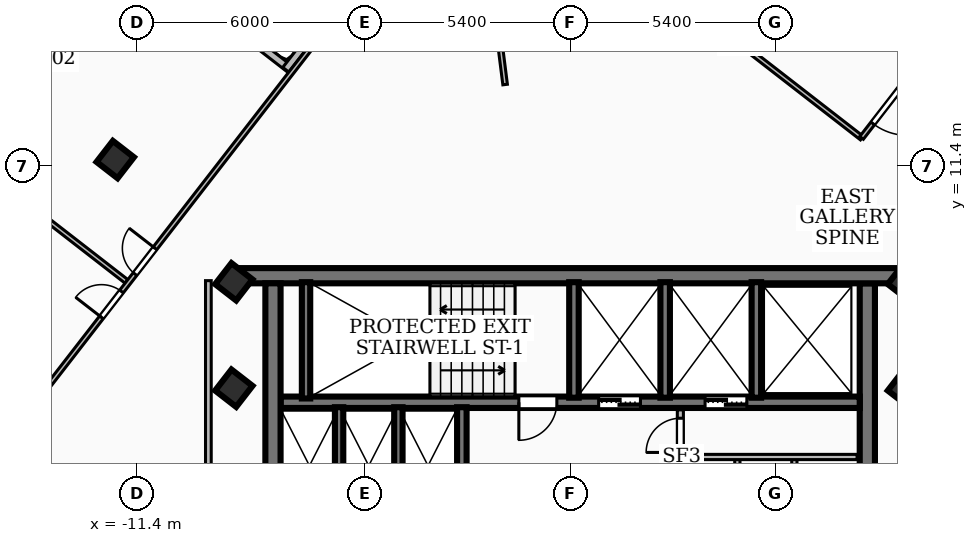
"""IFC4 building model, lengths in metres.
Left out: names, types, materials, properties, quantities, classifications, styles, units other than length and angle.
Written with IfcOpenShell. Run it as: python <this file> out.ifc"""

import sys

from ifc_helpers import new_model, si_unit, direction, frame, frame_2d, origin, origin_2d, place, context, subcontext, project, spatial, rectangle, extrude, element, fill, save


model = new_model("IFC4")
c1 = context("Model", 3, precision=1e-05, world=origin(), true_north=direction((0.0, 1.0)))
c2 = subcontext(c1, "Body", "Model", "MODEL_VIEW")
j1 = project(units=[si_unit("LENGTHUNIT", "METRE"), si_unit("PLANEANGLEUNIT", "RADIAN")], contexts=[c1])
p1 = place(None, origin())
s1 = spatial("IfcSite", under=j1, at=p1, CompositionType="ELEMENT")
p2 = place(p1, origin())
s2 = spatial("IfcBuilding", under=s1, at=p2, CompositionType="ELEMENT")
p3 = place(p2, frame((0.0, 0.0, 257.76)))
s3 = spatial("IfcBuildingStorey", under=s2, at=p3, CompositionType="ELEMENT", Elevation=257.76)
p4 = place(p3, frame((-8.78, 8.51, 0.0), z_axis=(0.0, 0.0, 1.0), x_axis=(1.0, 0.0, 0.0)))
e1 = element("IfcWall", 1, at=p4, inside=s3, PredefinedType="SHEAR", context=c2, shape_type="SweptSolid", body=[
    extrude(rectangle(XDim=17.56, YDim=0.4, at=frame_2d((8.78, 0.0))), origin(), (0.0, 0.0, 1.0), 3.16),
])
for number, where, z_axis, x_axis in (
    (2, (-7.82, 1.95, 0.0), (0.0, 0.0, 1.0), (0.0, 1.0, 0.0)),
    (3, (7.82, 8.31, 0.0), (0.0, 0.0, 1.0), (0.0, -1.0, 0.0)),
):
    element("IfcWall", number, at=place(p3, frame(where, z_axis=z_axis, x_axis=x_axis)), inside=s3, PredefinedType="SHEAR", context=c2, shape_type="SweptSolid", body=[
        extrude(rectangle(XDim=6.36, YDim=0.4, at=frame_2d((3.18, 0.0))), origin(), (0.0, 0.0, 1.0), 3.16),
    ])
p5 = place(p3, frame((7.62, 5.18, 0.0), z_axis=(0.0, 0.0, 1.0), x_axis=(-1.0, 0.0, 0.0)))
e4 = element("IfcWall", 4, at=p5, inside=s3, PredefinedType="SOLIDWALL", context=c2, shape_type="SweptSolid", body=[
    extrude(rectangle(XDim=15.24, YDim=0.3, at=frame_2d((7.62, 0.0))), origin(), (0.0, 0.0, 1.0), 3.16),
])
p6 = place(p5, frame((5.77, 0.0, 0.0)))
e5 = element("IfcOpeningElement", 5, at=p6, cuts=e4, PredefinedType="OPENING", context=c2, shape_type="SweptSolid", body=[
    extrude(rectangle(XDim=1.1, YDim=2.15, at=frame_2d((0.55, 1.075))), frame((0.0, 0.16, 0.0), z_axis=(0.0, -1.0, 0.0), x_axis=(1.0, 0.0, 0.0)), (0.0, 0.0, 1.0), 0.32),
])
p7 = place(p5, frame((2.97, 0.0, 0.0)))
e6 = element("IfcOpeningElement", 6, at=p7, cuts=e4, PredefinedType="OPENING", context=c2, shape_type="SweptSolid", body=[
    extrude(rectangle(XDim=1.1, YDim=2.15, at=frame_2d((0.55, 1.075))), frame((0.0, 0.16, 0.0), z_axis=(0.0, -1.0, 0.0), x_axis=(1.0, 0.0, 0.0)), (0.0, 0.0, 1.0), 0.32),
])
p8 = place(p5, frame((7.97, 0.0, 0.0)))
e7 = element("IfcOpeningElement", 7, at=p8, cuts=e4, PredefinedType="OPENING", context=c2, shape_type="SweptSolid", body=[
    extrude(rectangle(XDim=1.0, YDim=2.1, at=frame_2d((0.5, 1.05))), frame((0.0, 0.16, 0.0), z_axis=(0.0, -1.0, 0.0), x_axis=(1.0, 0.0, 0.0)), (0.0, 0.0, 1.0), 0.32),
])
p9 = place(p3, frame((-6.95, 5.28, 0.0), z_axis=(0.0, 0.0, 1.0), x_axis=(0.0, 1.0, 0.0)))
e8 = element("IfcWall", 8, at=p9, inside=s3, PredefinedType="SOLIDWALL", context=c2, shape_type="SweptSolid", body=[
    extrude(rectangle(XDim=3.06, YDim=0.22, at=frame_2d((1.53, 0.0))), origin(), (0.0, 0.0, 1.0), 3.16),
])
for number, where, z_axis, x_axis in (
    (9, (0.1, 5.3, 0.0), (0.0, 0.0, 1.0), (0.0, 1.0, 0.0)),
    (10, (2.5, 5.3, 0.0), (0.0, 0.0, 1.0), (0.0, 1.0, 0.0)),
    (11, (4.9, 5.3, 0.0), (0.0, 0.0, 1.0), (0.0, 1.0, 0.0)),
):
    element("IfcWall", number, at=place(p3, frame(where, z_axis=z_axis, x_axis=x_axis)), inside=s3, PredefinedType="SOLIDWALL", context=c2, shape_type="SweptSolid", body=[
        extrude(rectangle(XDim=3.04, YDim=0.25, at=frame_2d((1.52, 0.0))), origin(), (0.0, 0.0, 1.0), 3.16),
    ])
p10 = place(p3, frame((-2.85, 1.98, 0.0), z_axis=(0.0, 0.0, 1.0), x_axis=(0.0, 1.0, 0.0)))
e12 = element("IfcWall", 12, at=p10, inside=s3, PredefinedType="SOLIDWALL", context=c2, shape_type="SweptSolid", body=[
    extrude(rectangle(XDim=3.07, YDim=0.25, at=frame_2d((1.535, 0.0))), origin(), (0.0, 0.0, 1.0), 3.16),
])
for number, where, z_axis, x_axis in (
    (13, (-6.08, 1.98, 0.0), (0.0, 0.0, 1.0), (0.0, 1.0, 0.0)),
    (14, (-4.52, 1.98, 0.0), (0.0, 0.0, 1.0), (0.0, 1.0, 0.0)),
):
    element("IfcWall", number, at=place(p3, frame(where, z_axis=z_axis, x_axis=x_axis)), inside=s3, PredefinedType="SOLIDWALL", context=c2, shape_type="SweptSolid", body=[
        extrude(rectangle(XDim=3.07, YDim=0.22, at=frame_2d((1.535, 0.0))), origin(), (0.0, 0.0, 1.0), 3.16),
    ])
for number, where, z_axis, x_axis in (
    (15, (-8.85, 5.55, 0.0), (0.0, 0.0, 1.0), (0.613, 0.79, 0.0)),
    (16, (8.85, 5.55, 0.0), (0.0, 0.0, 1.0), (0.613, 0.79, 0.0)),
    (17, (-8.85, 8.35, 0.0), (0.0, 0.0, 1.0), (0.613, 0.79, 0.0)),
    (18, (8.85, 8.35, 0.0), (0.0, 0.0, 1.0), (0.613, 0.79, 0.0)),
    (19, (-11.971, 11.566, 0.0), (0.0, 0.0, 1.0), (0.613, 0.79, 0.0)),
):
    element("IfcColumn", number, at=place(p3, frame(where, z_axis=z_axis, x_axis=x_axis)), inside=s3, PredefinedType="COLUMN", context=c2, shape_type="SweptSolid", body=[
        extrude(rectangle(XDim=0.7, YDim=0.7, at=origin_2d()), origin(), (0.0, 0.0, 1.0), 3.42),
    ])
p11 = place(p3, frame((-18.357, 8.149, 0.0), z_axis=(0.0, 0.0, 1.0), x_axis=(0.612797548915, 0.790239940806, 0.0)))
e20 = element("IfcWall", 20, at=p11, inside=s3, PredefinedType="SOLIDWALL", context=c2, shape_type="SweptSolid", body=[
    extrude(rectangle(XDim=9.824, YDim=0.2, at=frame_2d((4.912, 0.0))), origin(), (0.0, 0.0, 1.0), 3.16),
])
p12 = place(p11, frame((6.462, 0.0, 0.85)))
e21 = element("IfcOpeningElement", 21, at=p12, cuts=e20, PredefinedType="OPENING", context=c2, shape_type="SweptSolid", body=[
    extrude(rectangle(XDim=2.4, YDim=2.1, at=frame_2d((1.2, 1.05))), frame((0.0, 0.11, 0.0), z_axis=(0.0, -1.0, 0.0), x_axis=(1.0, 0.0, 0.0)), (0.0, 0.0, 1.0), 0.22),
])
p13 = place(p3, frame((-10.248, 16.175, 0.0), z_axis=(0.0, 0.0, 1.0), x_axis=(0.790239683444, -0.612797880797, 0.0)))
e22 = element("IfcWall", 22, at=p13, inside=s3, PredefinedType="SOLIDWALL", context=c2, shape_type="SweptSolid", body=[
    extrude(rectangle(XDim=3.641, YDim=0.2, at=frame_2d((1.82, 0.0))), origin(), (0.0, 0.0, 1.0), 3.16),
])
p14 = place(p3, frame((-7.483, 13.93, 0.0), z_axis=(0.0, 0.0, 1.0), x_axis=(0.612826373036, 0.790217588081, 0.0)))
e23 = element("IfcWall", 23, at=p14, inside=s3, PredefinedType="SOLIDWALL", context=c2, shape_type="SweptSolid", body=[
    extrude(rectangle(XDim=6.542, YDim=0.2, at=frame_2d((3.271, 0.0))), origin(), (0.0, 0.0, 1.0), 3.16),
])
p15 = place(p3, frame((2.9, 2.04, 0.0), z_axis=(0.0, 0.0, 1.0), x_axis=(0.0, 1.0, 0.0)))
e24 = element("IfcWall", 24, at=p15, inside=s3, PredefinedType="PARTITIONING", context=c2, shape_type="SweptSolid", body=[
    extrude(rectangle(XDim=2.94, YDim=0.16, at=frame_2d((1.47, 0.0))), origin(), (0.0, 0.0, 1.0), 2.39),
])
p16 = place(p15, frame((1.82, 0.0, 0.0)))
e25 = element("IfcOpeningElement", 25, at=p16, cuts=e24, PredefinedType="OPENING", context=c2, shape_type="SweptSolid", body=[
    extrude(rectangle(XDim=0.9, YDim=2.06, at=frame_2d((0.45, 1.03))), frame((0.0, 0.09, 0.0), z_axis=(0.0, -1.0, 0.0), x_axis=(1.0, 0.0, 0.0)), (0.0, 0.0, 1.0), 0.18),
])
p17 = place(p3, frame((2.9, 3.74, 0.0), z_axis=(0.0, 0.0, 1.0), x_axis=(1.0, 0.0, 0.0)))
e26 = element("IfcWall", 26, at=p17, inside=s3, PredefinedType="PARTITIONING", context=c2, shape_type="SweptSolid", body=[
    extrude(rectangle(XDim=4.65, YDim=0.138, at=frame_2d((2.325, 0.0))), origin(), (0.0, 0.0, 1.0), 3.16),
])
for number, where, z_axis, x_axis in (
    (27, (4.4, 1.85, 0.0), (0.0, 0.0, 1.0), (0.0, 1.0, 0.0)),
    (28, (5.9, 1.85, 0.0), (0.0, 0.0, 1.0), (0.0, 1.0, 0.0)),
):
    element("IfcWall", number, at=place(p3, frame(where, z_axis=z_axis, x_axis=x_axis)), inside=s3, PredefinedType="PARTITIONING", context=c2, shape_type="SweptSolid", body=[
        extrude(rectangle(XDim=1.89, YDim=0.138, at=frame_2d((0.945, 0.0))), origin(), (0.0, 0.0, 1.0), 2.39),
    ])
p18 = place(p3, frame((-9.52, 1.75, 0.0), z_axis=(0.0, 0.0, 1.0), x_axis=(0.0, 1.0, 0.0)))
e29 = element("IfcWall", 29, at=p18, inside=s3, PredefinedType="PARTITIONING", context=c2, shape_type="SweptSolid", body=[
    extrude(rectangle(XDim=6.63, YDim=0.15, at=frame_2d((3.315, 0.0))), origin(), (0.0, 0.0, 1.0), 2.53),
])
p19 = place(p3, frame((-1.711, 13.54, 0.0), z_axis=(0.0, 0.0, 1.0), x_axis=(-0.125366398214, 0.992110511082, 0.0)))
e30 = element("IfcWall", 30, at=p19, inside=s3, PredefinedType="PARTITIONING", context=c2, shape_type="SweptSolid", body=[
    extrude(rectangle(XDim=6.047, YDim=0.12, at=frame_2d((3.023, 0.0))), origin(), (0.0, 0.0, 1.0), 3.16),
])
p20 = place(p3, frame((7.676, 12.131, 0.0), z_axis=(0.0, 0.0, 1.0), x_axis=(-0.790137186805, 0.61293003355, 0.0)))
e31 = element("IfcWall", 31, at=p20, inside=s3, PredefinedType="PARTITIONING", context=c2, shape_type="SweptSolid", body=[
    extrude(rectangle(XDim=8.149, YDim=0.12, at=frame_2d((4.075, 0.0))), origin(), (0.0, 0.0, 1.0), 3.16),
])
p21 = place(p3, frame((9.544, 14.555, 0.0), z_axis=(0.0, 0.0, 1.0), x_axis=(-0.612990234131, -0.79009048397, 0.0)))
e32 = element("IfcWall", 32, at=p21, inside=s3, PredefinedType="PARTITIONING", context=c2, shape_type="SweptSolid", body=[
    extrude(rectangle(XDim=3.06, YDim=0.12, at=frame_2d((1.53, 0.0))), origin(), (0.0, 0.0, 1.0), 2.53),
])
p22 = place(p21, frame((1.08, 0.0, 0.0)))
e33 = element("IfcOpeningElement", 33, at=p22, cuts=e32, PredefinedType="OPENING", context=c2, shape_type="SweptSolid", body=[
    extrude(rectangle(XDim=1.5, YDim=2.12, at=frame_2d((0.75, 1.06))), frame((0.0, 0.07, 0.0), z_axis=(0.0, -1.0, 0.0), x_axis=(1.0, 0.0, 0.0)), (0.0, 0.0, 1.0), 0.14),
])
p23 = place(p3, frame((5.707, 17.531, 0.0), z_axis=(0.0, 0.0, 1.0), x_axis=(0.790153529347, -0.612908965557, 0.0)))
e34 = element("IfcWall", 34, at=p23, inside=s3, PredefinedType="PARTITIONING", context=c2, shape_type="SweptSolid", body=[
    extrude(rectangle(XDim=12.671, YDim=0.12, at=frame_2d((6.335, 0.0))), origin(), (0.0, 0.0, 1.0), 2.53),
])
p24 = place(p23, frame((6.405, 0.0, 0.0)))
e35 = element("IfcOpeningElement", 35, at=p24, cuts=e34, PredefinedType="OPENING", context=c2, shape_type="SweptSolid", body=[
    extrude(rectangle(XDim=0.86, YDim=2.04, at=frame_2d((0.43, 1.02))), frame((0.0, 0.07, 0.0), z_axis=(0.0, -1.0, 0.0), x_axis=(1.0, 0.0, 0.0)), (0.0, 0.0, 1.0), 0.14),
])
p25 = place(p23, frame((5.205, 0.0, 0.0)))
e36 = element("IfcOpeningElement", 36, at=p25, cuts=e34, PredefinedType="OPENING", context=c2, shape_type="SweptSolid", body=[
    extrude(rectangle(XDim=0.86, YDim=2.04, at=frame_2d((0.43, 1.02))), frame((0.0, 0.07, 0.0), z_axis=(0.0, -1.0, 0.0), x_axis=(1.0, 0.0, 0.0)), (0.0, 0.0, 1.0), 0.14),
])
p26 = place(p3, frame((-11.676, 8.361, 0.0), z_axis=(0.0, 0.0, 1.0), x_axis=(-0.790227868115, 0.612813117071, 0.0)))
e37 = element("IfcWall", 37, at=p26, inside=s3, PredefinedType="PARTITIONING", context=c2, shape_type="SweptSolid", body=[
    extrude(rectangle(XDim=5.085, YDim=0.12, at=frame_2d((2.542, 0.0))), origin(), (0.0, 0.0, 1.0), 3.16),
])
p27 = place(p3, frame((-17.555, 0.683, 0.0), z_axis=(0.0, 0.0, 1.0), x_axis=(0.61291959311, 0.790145285617, 0.0)))
e38 = element("IfcWall", 38, at=p27, inside=s3, PredefinedType="PARTITIONING", context=c2, shape_type="SweptSolid", body=[
    extrude(rectangle(XDim=20.239, YDim=0.12, at=frame_2d((10.12, 0.0))), origin(), (0.0, 0.0, 1.0), 2.53),
])
p28 = place(p27, frame((9.96, 0.0, 0.0)))
e39 = element("IfcOpeningElement", 39, at=p28, cuts=e38, PredefinedType="OPENING", context=c2, shape_type="SweptSolid", body=[
    extrude(rectangle(XDim=0.86, YDim=2.04, at=frame_2d((0.43, 1.02))), frame((0.0, 0.07, 0.0), z_axis=(0.0, -1.0, 0.0), x_axis=(1.0, 0.0, 0.0)), (0.0, 0.0, 1.0), 0.14),
])
p29 = place(p27, frame((8.52, 0.0, 0.0)))
e40 = element("IfcOpeningElement", 40, at=p29, cuts=e38, PredefinedType="OPENING", context=c2, shape_type="SweptSolid", body=[
    extrude(rectangle(XDim=0.86, YDim=2.04, at=frame_2d((0.43, 1.02))), frame((0.0, 0.07, 0.0), z_axis=(0.0, -1.0, 0.0), x_axis=(1.0, 0.0, 0.0)), (0.0, 0.0, 1.0), 0.14),
])
p30 = place(p12, origin())
e41 = element("IfcWindow", 41, at=p30, inside=s3, PartitioningType="SINGLE_PANEL", PredefinedType="WINDOW", context=c2, shape_type="SweptSolid", body=[
    extrude(rectangle(XDim=2.4, YDim=2.1, at=frame_2d((1.2, 1.05))), frame((0.0, 0.03, 0.0), z_axis=(0.0, -1.0, 0.0), x_axis=(1.0, 0.0, 0.0)), (0.0, 0.0, 1.0), 0.06),
])
fill(e21, e41)
p31 = place(p6, origin())
e42 = element("IfcDoor", 42, at=p31, inside=s3, OperationType="DOUBLE_DOOR_SLIDING", PredefinedType="DOOR", context=c2, shape_type="SweptSolid", body=[
    extrude(rectangle(XDim=1.1, YDim=2.15, at=frame_2d((0.55, 1.075))), frame((0.0, 0.025, 0.0), z_axis=(0.0, -1.0, 0.0), x_axis=(1.0, 0.0, 0.0)), (0.0, 0.0, 1.0), 0.05),
])
fill(e5, e42)
p32 = place(p7, origin())
e43 = element("IfcDoor", 43, at=p32, inside=s3, OperationType="DOUBLE_DOOR_SLIDING", PredefinedType="DOOR", context=c2, shape_type="SweptSolid", body=[
    extrude(rectangle(XDim=1.1, YDim=2.15, at=frame_2d((0.55, 1.075))), frame((0.0, 0.025, 0.0), z_axis=(0.0, -1.0, 0.0), x_axis=(1.0, 0.0, 0.0)), (0.0, 0.0, 1.0), 0.05),
])
fill(e6, e43)
p33 = place(p8, origin())
e44 = element("IfcDoor", 44, at=p33, inside=s3, OperationType="SINGLE_SWING_RIGHT", PredefinedType="DOOR", context=c2, shape_type="SweptSolid", body=[
    extrude(rectangle(XDim=1.0, YDim=2.1, at=frame_2d((0.5, 1.05))), frame((0.0, 0.025, 0.0), z_axis=(0.0, -1.0, 0.0), x_axis=(1.0, 0.0, 0.0)), (0.0, 0.0, 1.0), 0.05),
])
fill(e7, e44)
p34 = place(p16, origin())
e45 = element("IfcDoor", 45, at=p34, inside=s3, OperationType="SINGLE_SWING_LEFT", PredefinedType="DOOR", context=c2, shape_type="SweptSolid", body=[
    extrude(rectangle(XDim=0.9, YDim=2.06, at=frame_2d((0.45, 1.03))), frame((0.0, 0.025, 0.0), z_axis=(0.0, -1.0, 0.0), x_axis=(1.0, 0.0, 0.0)), (0.0, 0.0, 1.0), 0.05),
])
fill(e25, e45)
p35 = place(p22, origin())
e46 = element("IfcDoor", 46, at=p35, inside=s3, OperationType="SINGLE_SWING_LEFT", PredefinedType="DOOR", context=c2, shape_type="SweptSolid", body=[
    extrude(rectangle(XDim=1.5, YDim=2.12, at=frame_2d((0.75, 1.06))), frame((0.0, 0.025, 0.0), z_axis=(0.0, -1.0, 0.0), x_axis=(1.0, 0.0, 0.0)), (0.0, 0.0, 1.0), 0.05),
])
fill(e33, e46)
p36 = place(p28, origin())
e47 = element("IfcDoor", 47, at=p36, inside=s3, OperationType="SINGLE_SWING_RIGHT", PredefinedType="DOOR", context=c2, shape_type="SweptSolid", body=[
    extrude(rectangle(XDim=0.86, YDim=2.04, at=frame_2d((0.43, 1.02))), frame((0.0, 0.025, 0.0), z_axis=(0.0, -1.0, 0.0), x_axis=(1.0, 0.0, 0.0)), (0.0, 0.0, 1.0), 0.05),
])
fill(e39, e47)
p37 = place(p29, origin())
e48 = element("IfcDoor", 48, at=p37, inside=s3, OperationType="SINGLE_SWING_LEFT", PredefinedType="DOOR", context=c2, shape_type="SweptSolid", body=[
    extrude(rectangle(XDim=0.86, YDim=2.04, at=frame_2d((0.43, 1.02))), frame((0.0, 0.025, 0.0), z_axis=(0.0, -1.0, 0.0), x_axis=(1.0, 0.0, 0.0)), (0.0, 0.0, 1.0), 0.05),
])
fill(e40, e48)
save(model, sys.argv[1])
